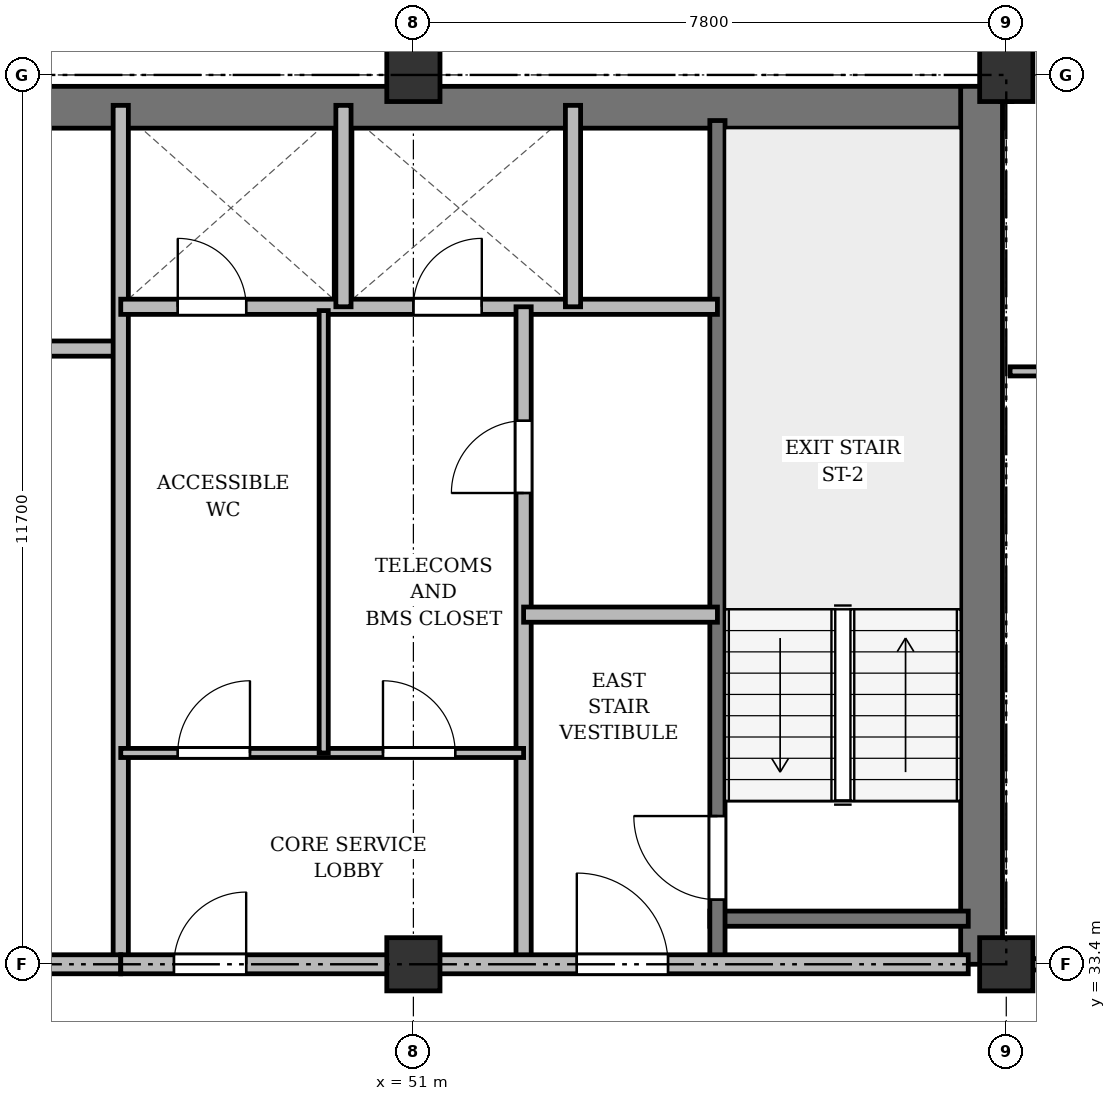
"""IFC4 building model, lengths in metres.
Left out: names, types, materials, properties, quantities, classifications, styles, units other than length and angle.
Written with IfcOpenShell. Run it as: python <this file> out.ifc"""

import sys

from ifc_helpers import new_model, si_unit, direction, frame, frame_2d, origin, origin_2d, place, context, subcontext, project, spatial, rectangle, extrude, source, transform, mapped, element, fill, save


model = new_model("IFC4")
c1 = context("Model", 3, precision=1e-05, world=origin(), true_north=direction((0.0, 1.0)))
c2 = subcontext(c1, "Body", "Model", "MODEL_VIEW")
j1 = project(units=[si_unit("LENGTHUNIT", "METRE"), si_unit("PLANEANGLEUNIT", "RADIAN")], contexts=[c1])
p1 = place(None, origin())
s1 = spatial("IfcSite", under=j1, at=p1, CompositionType="ELEMENT")
p2 = place(p1, origin())
s2 = spatial("IfcBuilding", under=s1, at=p2, CompositionType="ELEMENT")
p3 = place(p2, frame((0.0, 0.0, 168.1)))
s3 = spatial("IfcBuildingStorey", under=s2, at=p3, CompositionType="ELEMENT", Elevation=168.1)
m1 = source(origin(), c2, "Body", "SweptSolid", [
    extrude(rectangle(XDim=0.7, YDim=0.7, at=origin_2d()), origin(), (0.0, 0.0, 1.0), 3.6),
])
for number, where, z_axis, x_axis in (
    (1, (51.0, 33.4, 0.0), (0.0, 0.0, 1.0), (1.0, 0.0, 0.0)),
    (2, (51.0, 45.1, 0.0), (0.0, 0.0, 1.0), (1.0, 0.0, 0.0)),
    (3, (58.8, 33.4, 0.0), (0.0, 0.0, 1.0), (1.0, 0.0, 0.0)),
    (4, (58.8, 45.1, 0.0), (0.0, 0.0, 1.0), (1.0, 0.0, 0.0)),
):
    element("IfcColumn", number, at=place(p3, frame(where, z_axis=z_axis, x_axis=x_axis)), inside=s3, PredefinedType="COLUMN", context=c2, shape_type="MappedRepresentation", body=[
        mapped(m1, transform((0.0, 0.0, 0.0), x_axis=(1.0, 0.0, 0.0), y_axis=(0.0, 1.0, 0.0), z_axis=(0.0, 0.0, 1.0), scale=1.0)),
    ])
p4 = place(p3, frame((15.65, 44.675, 0.0), z_axis=(0.0, 0.0, 1.0), x_axis=(1.0, 0.0, 0.0)))
e5 = element("IfcWall", 5, at=p4, inside=s3, PredefinedType="SHEAR", context=c2, shape_type="SweptSolid", body=[
    extrude(rectangle(XDim=43.1, YDim=0.55, at=frame_2d((21.55, 0.0))), origin(), (0.0, 0.0, 1.0), 3.35),
])
p5 = place(p3, frame((58.475, 33.4, 0.0), z_axis=(0.0, 0.0, 1.0), x_axis=(0.0, 1.0, 0.0)))
e6 = element("IfcWall", 6, at=p5, inside=s3, PredefinedType="SHEAR", context=c2, shape_type="SweptSolid", body=[
    extrude(rectangle(XDim=11.55, YDim=0.55, at=frame_2d((5.775, 0.0))), origin(), (0.0, 0.0, 1.0), 3.35),
])
p6 = place(p3, frame((54.9, 34.0, 0.0), z_axis=(0.0, 0.0, 1.0), x_axis=(1.0, 0.0, 0.0)))
e7 = element("IfcWall", 7, at=p6, inside=s3, PredefinedType="SHEAR", context=c2, shape_type="SweptSolid", body=[
    extrude(rectangle(XDim=3.4, YDim=0.2, at=frame_2d((1.7, 0.0))), origin(), (0.0, 0.0, 1.0), 3.35),
])
p7 = place(p3, frame((55.0, 33.4, 0.0), z_axis=(0.0, 0.0, 1.0), x_axis=(0.0, 1.0, 0.0)))
e8 = element("IfcWall", 8, at=p7, inside=s3, PredefinedType="SHEAR", context=c2, shape_type="SweptSolid", body=[
    extrude(rectangle(XDim=11.1, YDim=0.2, at=frame_2d((5.55, 0.0))), origin(), (0.0, 0.0, 1.0), 3.35),
])
p8 = place(p7, frame((0.85, 0.0, 0.0)))
e9 = element("IfcOpeningElement", 9, at=p8, cuts=e8, PredefinedType="OPENING", context=c2, shape_type="SweptSolid", body=[
    extrude(rectangle(XDim=1.1, YDim=2.15, at=frame_2d((0.55, 1.075))), frame((0.0, 0.11, 0.0), z_axis=(0.0, -1.0, 0.0), x_axis=(1.0, 0.0, 0.0)), (0.0, 0.0, 1.0), 0.22),
])
p9 = place(p3, frame((40.25, 41.5, 0.0), z_axis=(0.0, 0.0, 1.0), x_axis=(1.0, 0.0, 0.0)))
e10 = element("IfcWall", 10, at=p9, inside=s3, PredefinedType="SOLIDWALL", context=c2, shape_type="SweptSolid", body=[
    extrude(rectangle(XDim=6.9, YDim=0.2, at=frame_2d((3.45, 0.0))), origin(), (0.0, 0.0, 1.0), 2.85),
])
p10 = place(p3, frame((47.15, 33.4, 0.0), z_axis=(0.0, 0.0, 1.0), x_axis=(0.0, 1.0, 0.0)))
e11 = element("IfcWall", 11, at=p10, inside=s3, PredefinedType="SOLIDWALL", context=c2, shape_type="SweptSolid", body=[
    extrude(rectangle(XDim=11.3, YDim=0.2, at=frame_2d((5.65, 0.0))), origin(), (0.0, 0.0, 1.0), 2.75),
])
p11 = place(p3, frame((33.3, 33.4, 0.0), z_axis=(0.0, 0.0, 1.0), x_axis=(1.0, 0.0, 0.0)))
e12 = element("IfcWall", 12, at=p11, inside=s3, PredefinedType="PARTITIONING", context=c2, shape_type="SweptSolid", body=[
    extrude(rectangle(XDim=13.85, YDim=0.25, at=frame_2d((6.925, 0.0))), origin(), (0.0, 0.0, 1.0), 2.75),
])
p12 = place(p11, frame((4.2, 0.0, 0.0)))
e13 = element("IfcOpeningElement", 13, at=p12, cuts=e12, PredefinedType="OPENING", context=c2, shape_type="SweptSolid", body=[
    extrude(rectangle(XDim=1.6, YDim=2.2, at=frame_2d((0.8, 1.1))), frame((0.0, 0.135, 0.0), z_axis=(0.0, -1.0, 0.0), x_axis=(1.0, 0.0, 0.0)), (0.0, 0.0, 1.0), 0.27),
])
p13 = place(p3, frame((47.15, 42.05, 0.0), z_axis=(0.0, 0.0, 1.0), x_axis=(1.0, 0.0, 0.0)))
e14 = element("IfcWall", 14, at=p13, inside=s3, PredefinedType="SOLIDWALL", context=c2, shape_type="SweptSolid", body=[
    extrude(rectangle(XDim=7.85, YDim=0.2, at=frame_2d((3.925, 0.0))), origin(), (0.0, 0.0, 1.0), 2.85),
])
p14 = place(p13, frame((0.75, 0.0, 0.0)))
e15 = element("IfcOpeningElement", 15, at=p14, cuts=e14, PredefinedType="OPENING", context=c2, shape_type="SweptSolid", body=[
    extrude(rectangle(XDim=0.9, YDim=2.1, at=frame_2d((0.45, 1.05))), frame((0.0, 0.11, 0.0), z_axis=(0.0, -1.0, 0.0), x_axis=(1.0, 0.0, 0.0)), (0.0, 0.0, 1.0), 0.22),
])
p15 = place(p13, frame((3.85, 0.0, 0.0)))
e16 = element("IfcOpeningElement", 16, at=p15, cuts=e14, PredefinedType="OPENING", context=c2, shape_type="SweptSolid", body=[
    extrude(rectangle(XDim=0.9, YDim=2.1, at=frame_2d((0.45, 1.05))), frame((0.0, 0.11, 0.0), z_axis=(0.0, -1.0, 0.0), x_axis=(1.0, 0.0, 0.0)), (0.0, 0.0, 1.0), 0.22),
])
for number, where, z_axis, x_axis in (
    (17, (50.08, 42.05, 0.0), (0.0, 0.0, 1.0), (0.0, 1.0, 0.0)),
    (18, (53.1, 42.05, 0.0), (0.0, 0.0, 1.0), (0.0, 1.0, 0.0)),
):
    element("IfcWall", number, at=place(p3, frame(where, z_axis=z_axis, x_axis=x_axis)), inside=s3, PredefinedType="SOLIDWALL", context=c2, shape_type="SweptSolid", body=[
        extrude(rectangle(XDim=2.65, YDim=0.2, at=frame_2d((1.325, 0.0))), origin(), (0.0, 0.0, 1.0), 3.35),
    ])
p16 = place(p3, frame((52.45, 33.4, 0.0), z_axis=(0.0, 0.0, 1.0), x_axis=(0.0, 1.0, 0.0)))
e19 = element("IfcWall", 19, at=p16, inside=s3, PredefinedType="PARTITIONING", context=c2, shape_type="SweptSolid", body=[
    extrude(rectangle(XDim=8.65, YDim=0.2, at=frame_2d((4.325, 0.0))), origin(), (0.0, 0.0, 1.0), 2.75),
])
p17 = place(p16, frame((6.2, 0.0, 0.0)))
e20 = element("IfcOpeningElement", 20, at=p17, cuts=e19, PredefinedType="OPENING", context=c2, shape_type="SweptSolid", body=[
    extrude(rectangle(XDim=0.95, YDim=2.15, at=frame_2d((0.475, 1.075))), frame((0.0, 0.11, 0.0), z_axis=(0.0, -1.0, 0.0), x_axis=(1.0, 0.0, 0.0)), (0.0, 0.0, 1.0), 0.22),
])
p18 = place(p3, frame((52.45, 38.0, 0.0), z_axis=(0.0, 0.0, 1.0), x_axis=(1.0, 0.0, 0.0)))
e21 = element("IfcWall", 21, at=p18, inside=s3, PredefinedType="PARTITIONING", context=c2, shape_type="SweptSolid", body=[
    extrude(rectangle(XDim=2.55, YDim=0.2, at=frame_2d((1.275, 0.0))), origin(), (0.0, 0.0, 1.0), 3.35),
])
p19 = place(p3, frame((47.15, 36.18, 0.0), z_axis=(0.0, 0.0, 1.0), x_axis=(1.0, 0.0, 0.0)))
e22 = element("IfcWall", 22, at=p19, inside=s3, PredefinedType="PARTITIONING", context=c2, shape_type="SweptSolid", body=[
    extrude(rectangle(XDim=5.3, YDim=0.12, at=frame_2d((2.65, 0.0))), origin(), (0.0, 0.0, 1.0), 2.85),
])
p20 = place(p19, frame((0.75, 0.0, 0.0)))
e23 = element("IfcOpeningElement", 23, at=p20, cuts=e22, PredefinedType="OPENING", context=c2, shape_type="SweptSolid", body=[
    extrude(rectangle(XDim=0.95, YDim=2.15, at=frame_2d((0.475, 1.075))), frame((0.0, 0.07, 0.0), z_axis=(0.0, -1.0, 0.0), x_axis=(1.0, 0.0, 0.0)), (0.0, 0.0, 1.0), 0.14),
])
p21 = place(p19, frame((3.45, 0.0, 0.0)))
e24 = element("IfcOpeningElement", 24, at=p21, cuts=e22, PredefinedType="OPENING", context=c2, shape_type="SweptSolid", body=[
    extrude(rectangle(XDim=0.95, YDim=2.15, at=frame_2d((0.475, 1.075))), frame((0.0, 0.07, 0.0), z_axis=(0.0, -1.0, 0.0), x_axis=(1.0, 0.0, 0.0)), (0.0, 0.0, 1.0), 0.14),
])
p22 = place(p3, frame((49.82, 36.18, 0.0), z_axis=(0.0, 0.0, 1.0), x_axis=(0.0, 1.0, 0.0)))
e25 = element("IfcWall", 25, at=p22, inside=s3, PredefinedType="PARTITIONING", context=c2, shape_type="SweptSolid", body=[
    extrude(rectangle(XDim=5.82, YDim=0.12, at=frame_2d((2.91, 0.0))), origin(), (0.0, 0.0, 1.0), 3.35),
])
p23 = place(p3, frame((47.15, 33.4, 0.0), z_axis=(0.0, 0.0, 1.0), x_axis=(1.0, 0.0, 0.0)))
e26 = element("IfcWall", 26, at=p23, inside=s3, PredefinedType="PARTITIONING", context=c2, shape_type="SweptSolid", body=[
    extrude(rectangle(XDim=11.15, YDim=0.25, at=frame_2d((5.575, 0.0))), origin(), (0.0, 0.0, 1.0), 2.75),
])
p24 = place(p23, frame((0.7, 0.0, 0.0)))
e27 = element("IfcOpeningElement", 27, at=p24, cuts=e26, PredefinedType="OPENING", context=c2, shape_type="SweptSolid", body=[
    extrude(rectangle(XDim=0.95, YDim=2.15, at=frame_2d((0.475, 1.075))), frame((0.0, 0.135, 0.0), z_axis=(0.0, -1.0, 0.0), x_axis=(1.0, 0.0, 0.0)), (0.0, 0.0, 1.0), 0.27),
])
p25 = place(p23, frame((6.0, 0.0, 0.0)))
e28 = element("IfcOpeningElement", 28, at=p25, cuts=e26, PredefinedType="OPENING", context=c2, shape_type="SweptSolid", body=[
    extrude(rectangle(XDim=1.2, YDim=2.15, at=frame_2d((0.6, 1.075))), frame((0.0, 0.135, 0.0), z_axis=(0.0, -1.0, 0.0), x_axis=(1.0, 0.0, 0.0)), (0.0, 0.0, 1.0), 0.27),
])
p26 = place(p3, frame((58.85, 41.2, 0.0), z_axis=(0.0, 0.0, 1.0), x_axis=(1.0, 0.0, 0.0)))
e29 = element("IfcWall", 29, at=p26, inside=s3, PredefinedType="PARTITIONING", context=c2, shape_type="SweptSolid", body=[
    extrude(rectangle(XDim=7.45, YDim=0.12, at=frame_2d((3.725, 0.0))), origin(), (0.0, 0.0, 1.0), 2.85),
])
p27 = place(p26, frame((3.157, 0.0, 0.0)))
e30 = element("IfcOpeningElement", 30, at=p27, cuts=e29, PredefinedType="OPENING", context=c2, shape_type="SweptSolid", body=[
    extrude(rectangle(XDim=0.95, YDim=2.15, at=frame_2d((0.475, 1.075))), frame((0.0, 0.07, 0.0), z_axis=(0.0, -1.0, 0.0), x_axis=(1.0, 0.0, 0.0)), (0.0, 0.0, 1.0), 0.14),
])
p28 = place(p3, frame((58.8, 33.4, 0.0), z_axis=(0.0, 0.0, 1.0), x_axis=(1.0, 0.0, 0.0)))
e31 = element("IfcWall", 31, at=p28, inside=s3, PredefinedType="PARTITIONING", context=c2, shape_type="SweptSolid", body=[
    extrude(rectangle(XDim=7.55, YDim=0.15, at=frame_2d((3.775, 0.0))), origin(), (0.0, 0.0, 1.0), 2.75),
])
p29 = place(p28, frame((3.2, 0.0, 0.0)))
e32 = element("IfcOpeningElement", 32, at=p29, cuts=e31, PredefinedType="OPENING", context=c2, shape_type="SweptSolid", body=[
    extrude(rectangle(XDim=0.95, YDim=2.15, at=frame_2d((0.475, 1.075))), frame((0.0, 0.085, 0.0), z_axis=(0.0, -1.0, 0.0), x_axis=(1.0, 0.0, 0.0)), (0.0, 0.0, 1.0), 0.17),
])
p30 = place(p3, frame((58.8, 44.75, 0.0), z_axis=(0.0, 0.0, 1.0), x_axis=(0.0, 1.0, 0.0)))
e33 = element("IfcWall", 33, at=p30, inside=s3, PredefinedType="PARTITIONING", context=c2, shape_type="SweptSolid", body=[
    extrude(rectangle(XDim=3.61, YDim=0.15, at=frame_2d((1.805, 0.0))), origin(), (0.0, 0.0, 1.0), 2.85),
])
p31 = place(p30, frame((1.1, 0.0, 0.0)))
e34 = element("IfcOpeningElement", 34, at=p31, cuts=e33, PredefinedType="OPENING", context=c2, shape_type="SweptSolid", body=[
    extrude(rectangle(XDim=0.95, YDim=2.15, at=frame_2d((0.475, 1.075))), frame((0.0, 0.085, 0.0), z_axis=(0.0, -1.0, 0.0), x_axis=(1.0, 0.0, 0.0)), (0.0, 0.0, 1.0), 0.17),
])
m2 = source(origin(), c2, "Body", "SweptSolid", [
    extrude(rectangle(XDim=1.1, YDim=2.15, at=frame_2d((0.55, 1.075))), frame((0.0, 0.025, 0.0), z_axis=(0.0, -1.0, 0.0), x_axis=(1.0, 0.0, 0.0)), (0.0, 0.0, 1.0), 0.05),
])
p32 = place(p8, origin())
e35 = element("IfcDoor", 35, at=p32, inside=s3, OperationType="SINGLE_SWING_RIGHT", PredefinedType="DOOR", context=c2, shape_type="MappedRepresentation", body=[
    mapped(m2, transform((0.0, 0.0, 0.0), x_axis=(1.0, 0.0, 0.0), y_axis=(0.0, 1.0, 0.0), z_axis=(0.0, 0.0, 1.0), scale=1.0)),
])
fill(e9, e35)
m3 = source(origin(), c2, "Body", "SweptSolid", [
    extrude(rectangle(XDim=0.9, YDim=2.1, at=frame_2d((0.45, 1.05))), frame((0.0, 0.025, 0.0), z_axis=(0.0, -1.0, 0.0), x_axis=(1.0, 0.0, 0.0)), (0.0, 0.0, 1.0), 0.05),
])
p33 = place(p14, origin())
e36 = element("IfcDoor", 36, at=p33, inside=s3, OperationType="SINGLE_SWING_LEFT", PredefinedType="DOOR", context=c2, shape_type="MappedRepresentation", body=[
    mapped(m3, transform((0.0, 0.0, 0.0), x_axis=(1.0, 0.0, 0.0), y_axis=(0.0, 1.0, 0.0), z_axis=(0.0, 0.0, 1.0), scale=1.0)),
])
fill(e15, e36)
p34 = place(p15, origin())
e37 = element("IfcDoor", 37, at=p34, inside=s3, OperationType="SINGLE_SWING_RIGHT", PredefinedType="DOOR", context=c2, shape_type="MappedRepresentation", body=[
    mapped(m3, transform((0.0, 0.0, 0.0), x_axis=(1.0, 0.0, 0.0), y_axis=(0.0, 1.0, 0.0), z_axis=(0.0, 0.0, 1.0), scale=1.0)),
])
fill(e16, e37)
m4 = source(origin(), c2, "Body", "SweptSolid", [
    extrude(rectangle(XDim=0.95, YDim=2.15, at=frame_2d((0.475, 1.075))), frame((0.0, 0.025, 0.0), z_axis=(0.0, -1.0, 0.0), x_axis=(1.0, 0.0, 0.0)), (0.0, 0.0, 1.0), 0.05),
])
p35 = place(p17, origin())
e38 = element("IfcDoor", 38, at=p35, inside=s3, OperationType="SINGLE_SWING_LEFT", PredefinedType="DOOR", context=c2, shape_type="MappedRepresentation", body=[
    mapped(m4, transform((0.0, 0.0, 0.0), x_axis=(1.0, 0.0, 0.0), y_axis=(0.0, 1.0, 0.0), z_axis=(0.0, 0.0, 1.0), scale=1.0)),
])
fill(e20, e38)
p36 = place(p20, origin())
e39 = element("IfcDoor", 39, at=p36, inside=s3, OperationType="SINGLE_SWING_RIGHT", PredefinedType="DOOR", context=c2, shape_type="MappedRepresentation", body=[
    mapped(m4, transform((0.0, 0.0, 0.0), x_axis=(1.0, 0.0, 0.0), y_axis=(0.0, 1.0, 0.0), z_axis=(0.0, 0.0, 1.0), scale=1.0)),
])
fill(e23, e39)
p37 = place(p21, origin())
e40 = element("IfcDoor", 40, at=p37, inside=s3, OperationType="SINGLE_SWING_LEFT", PredefinedType="DOOR", context=c2, shape_type="MappedRepresentation", body=[
    mapped(m4, transform((0.0, 0.0, 0.0), x_axis=(1.0, 0.0, 0.0), y_axis=(0.0, 1.0, 0.0), z_axis=(0.0, 0.0, 1.0), scale=1.0)),
])
fill(e24, e40)
p38 = place(p24, origin())
e41 = element("IfcDoor", 41, at=p38, inside=s3, OperationType="SINGLE_SWING_RIGHT", PredefinedType="DOOR", context=c2, shape_type="MappedRepresentation", body=[
    mapped(m4, transform((0.0, 0.0, 0.0), x_axis=(1.0, 0.0, 0.0), y_axis=(0.0, 1.0, 0.0), z_axis=(0.0, 0.0, 1.0), scale=1.0)),
])
fill(e27, e41)
m5 = source(origin(), c2, "Body", "SweptSolid", [
    extrude(rectangle(XDim=1.2, YDim=2.15, at=frame_2d((0.6, 1.075))), frame((0.0, 0.025, 0.0), z_axis=(0.0, -1.0, 0.0), x_axis=(1.0, 0.0, 0.0)), (0.0, 0.0, 1.0), 0.05),
])
p39 = place(p25, origin())
e42 = element("IfcDoor", 42, at=p39, inside=s3, OperationType="SINGLE_SWING_LEFT", PredefinedType="DOOR", context=c2, shape_type="MappedRepresentation", body=[
    mapped(m5, transform((0.0, 0.0, 0.0), x_axis=(1.0, 0.0, 0.0), y_axis=(0.0, 1.0, 0.0), z_axis=(0.0, 0.0, 1.0), scale=1.0)),
])
fill(e28, e42)
save(model, sys.argv[1])
